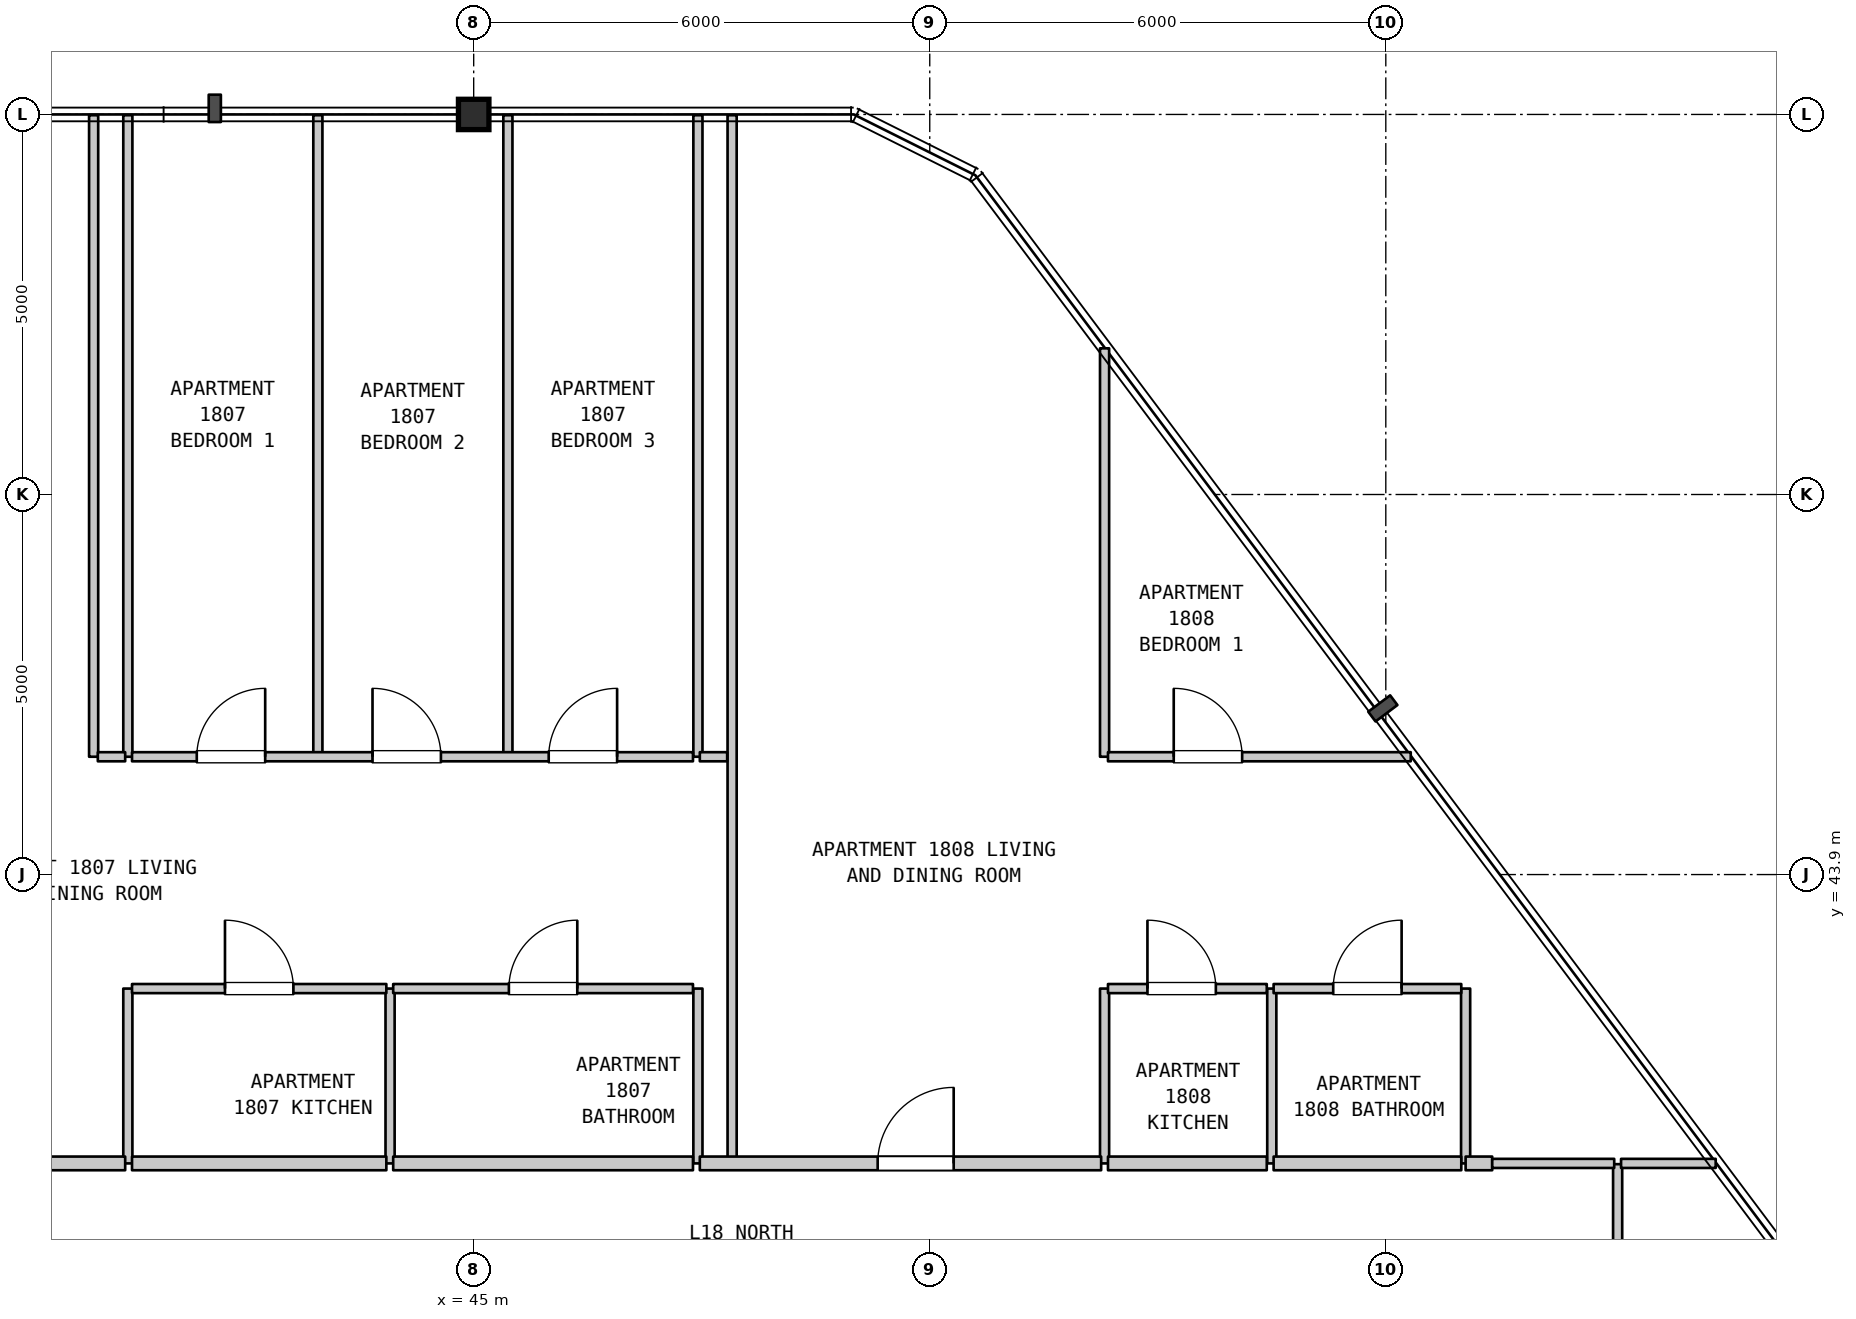
"""IFC4 building model, lengths in metres.
Left out: names, types, materials, properties, quantities, classifications, styles, units other than length and angle.
Written with IfcOpenShell. Run it as: python <this file> out.ifc"""

import sys

from ifc_helpers import new_model, si_unit, direction, frame, frame_2d, origin, origin_2d, place, context, subcontext, project, spatial, rectangle, i_section, extrude, element, fill, save


model = new_model("IFC4")
c1 = context("Model", 3, precision=1e-05, world=origin(), true_north=direction((0.0, 1.0)))
c2 = subcontext(c1, "Body", "Model", "MODEL_VIEW")
j1 = project(units=[si_unit("LENGTHUNIT", "METRE"), si_unit("PLANEANGLEUNIT", "RADIAN")], contexts=[c1])
p1 = place(None, origin())
s1 = spatial("IfcSite", under=j1, at=p1, CompositionType="ELEMENT")
p2 = place(p1, origin())
s2 = spatial("IfcBuilding", under=s1, at=p2, CompositionType="ELEMENT")
p3 = place(p2, frame((0.0, 0.0, 77.5)))
s3 = spatial("IfcBuildingStorey", under=s2, at=p3, CompositionType="ELEMENT", Elevation=77.5)
p4 = place(p3, frame((45.0, 53.9, 0.0), z_axis=(0.0, 0.0, 1.0), x_axis=(1.0, 0.0, 0.0)))
e1 = element("IfcColumn", 1, at=p4, inside=s3, PredefinedType="COLUMN", context=c2, shape_type="SweptSolid", body=[
    extrude(i_section(OverallWidth=0.401, OverallDepth=0.399, WebThickness=0.025, FlangeThickness=0.04, FilletRadius=0.015, at=origin_2d()), origin(), (0.0, 0.0, 1.0), 3.7),
])
p5 = place(p3, frame((40.0, 45.45, 0.0), z_axis=(0.0, 0.0, 1.0), x_axis=(0.0, 1.0, 0.0)))
e2 = element("IfcWall", 2, at=p5, inside=s3, PredefinedType="PARTITIONING", context=c2, shape_type="SweptSolid", body=[
    extrude(rectangle(XDim=8.44, YDim=0.12, at=frame_2d((4.22, 0.0))), origin(), (0.0, 0.0, 1.0), 3.28),
])
p6 = place(p3, frame((40.45, 40.1, 0.0), z_axis=(0.0, 0.0, 1.0), x_axis=(0.0, 1.0, 0.0)))
e3 = element("IfcWall", 3, at=p6, inside=s3, PredefinedType="PARTITIONING", context=c2, shape_type="SweptSolid", body=[
    extrude(rectangle(XDim=2.3, YDim=0.12, at=frame_2d((1.15, 0.0))), origin(), (0.0, 0.0, 1.0), 3.28),
])
for number, where, z_axis, x_axis in (
    (4, (40.45, 45.45, 0.0), (0.0, 0.0, 1.0), (0.0, 1.0, 0.0)),
    (5, (42.95, 45.45, 0.0), (0.0, 0.0, 1.0), (0.0, 1.0, 0.0)),
):
    element("IfcWall", number, at=place(p3, frame(where, z_axis=z_axis, x_axis=x_axis)), inside=s3, PredefinedType="PARTITIONING", context=c2, shape_type="SweptSolid", body=[
        extrude(rectangle(XDim=8.44, YDim=0.12, at=frame_2d((4.22, 0.0))), origin(), (0.0, 0.0, 1.0), 3.28),
    ])
p7 = place(p3, frame((43.9, 40.1, 0.0), z_axis=(0.0, 0.0, 1.0), x_axis=(0.0, 1.0, 0.0)))
e6 = element("IfcWall", 6, at=p7, inside=s3, PredefinedType="PARTITIONING", context=c2, shape_type="SweptSolid", body=[
    extrude(rectangle(XDim=2.3, YDim=0.12, at=frame_2d((1.15, 0.0))), origin(), (0.0, 0.0, 1.0), 3.28),
])
p8 = place(p3, frame((45.45, 45.45, 0.0), z_axis=(0.0, 0.0, 1.0), x_axis=(0.0, 1.0, 0.0)))
e7 = element("IfcWall", 7, at=p8, inside=s3, PredefinedType="PARTITIONING", context=c2, shape_type="SweptSolid", body=[
    extrude(rectangle(XDim=8.44, YDim=0.12, at=frame_2d((4.22, 0.0))), origin(), (0.0, 0.0, 1.0), 3.28),
])
p9 = place(p3, frame((47.95, 40.1, 0.0), z_axis=(0.0, 0.0, 1.0), x_axis=(0.0, 1.0, 0.0)))
e8 = element("IfcWall", 8, at=p9, inside=s3, PredefinedType="PARTITIONING", context=c2, shape_type="SweptSolid", body=[
    extrude(rectangle(XDim=2.3, YDim=0.12, at=frame_2d((1.15, 0.0))), origin(), (0.0, 0.0, 1.0), 3.28),
])
p10 = place(p3, frame((47.95, 45.45, 0.0), z_axis=(0.0, 0.0, 1.0), x_axis=(0.0, 1.0, 0.0)))
e9 = element("IfcWall", 9, at=p10, inside=s3, PredefinedType="PARTITIONING", context=c2, shape_type="SweptSolid", body=[
    extrude(rectangle(XDim=8.44, YDim=0.12, at=frame_2d((4.22, 0.0))), origin(), (0.0, 0.0, 1.0), 3.28),
])
p11 = place(p3, frame((48.4, 40.1, 0.0), z_axis=(0.0, 0.0, 1.0), x_axis=(0.0, 1.0, 0.0)))
e10 = element("IfcWall", 10, at=p11, inside=s3, PredefinedType="PARTITIONING", context=c2, shape_type="SweptSolid", body=[
    extrude(rectangle(XDim=13.79, YDim=0.12, at=frame_2d((6.895, 0.0))), origin(), (0.0, 0.0, 1.0), 3.28),
])
p12 = place(p3, frame((53.3, 40.1, 0.0), z_axis=(0.0, 0.0, 1.0), x_axis=(0.0, 1.0, 0.0)))
e11 = element("IfcWall", 11, at=p12, inside=s3, PredefinedType="PARTITIONING", context=c2, shape_type="SweptSolid", body=[
    extrude(rectangle(XDim=2.3, YDim=0.12, at=frame_2d((1.15, 0.0))), origin(), (0.0, 0.0, 1.0), 3.28),
])
p13 = place(p3, frame((53.3, 45.45, 0.0), z_axis=(0.0, 0.0, 1.0), x_axis=(0.0, 1.0, 0.0)))
e12 = element("IfcWall", 12, at=p13, inside=s3, PredefinedType="PARTITIONING", context=c2, shape_type="SweptSolid", body=[
    extrude(rectangle(XDim=5.373, YDim=0.12, at=frame_2d((2.687, 0.0))), origin(), (0.0, 0.0, 1.0), 3.28),
])
for number, where, z_axis, x_axis in (
    (13, (55.5, 40.1, 0.0), (0.0, 0.0, 1.0), (0.0, 1.0, 0.0)),
    (14, (58.05, 40.1, 0.0), (0.0, 0.0, 1.0), (0.0, 1.0, 0.0)),
):
    element("IfcWall", number, at=place(p3, frame(where, z_axis=z_axis, x_axis=x_axis)), inside=s3, PredefinedType="PARTITIONING", context=c2, shape_type="SweptSolid", body=[
        extrude(rectangle(XDim=2.3, YDim=0.12, at=frame_2d((1.15, 0.0))), origin(), (0.0, 0.0, 1.0), 3.28),
    ])
p14 = place(p3, frame((60.05, 37.89, 0.0), z_axis=(0.0, 0.0, 1.0), x_axis=(0.0, 1.0, 0.0)))
e15 = element("IfcWall", 15, at=p14, inside=s3, PredefinedType="PARTITIONING", context=c2, shape_type="SweptSolid", body=[
    extrude(rectangle(XDim=2.2, YDim=0.12, at=frame_2d((1.1, 0.0))), origin(), (0.0, 0.0, 1.0), 3.28),
])
p15 = place(p3, frame((35.105, 40.1, 0.0), z_axis=(0.0, 0.0, 1.0), x_axis=(1.0, 0.0, 0.0)))
e16 = element("IfcWall", 16, at=p15, inside=s3, PredefinedType="STANDARD", context=c2, shape_type="SweptSolid", body=[
    extrude(rectangle(XDim=5.31, YDim=0.18, at=frame_2d((2.655, 0.0))), origin(), (0.0, 0.0, 1.0), 3.28),
])
p16 = place(p15, frame((2.155, 0.0, 0.0)))
e17 = element("IfcOpeningElement", 17, at=p16, cuts=e16, PredefinedType="OPENING", context=c2, shape_type="SweptSolid", body=[
    extrude(rectangle(XDim=1.0, YDim=2.15, at=frame_2d((0.5, 1.075))), frame((0.0, 0.1, 0.0), z_axis=(0.0, -1.0, 0.0), x_axis=(1.0, 0.0, 0.0)), (0.0, 0.0, 1.0), 0.2),
])
p17 = place(p3, frame((40.505, 40.1, 0.0), z_axis=(0.0, 0.0, 1.0), x_axis=(1.0, 0.0, 0.0)))
e18 = element("IfcWall", 18, at=p17, inside=s3, PredefinedType="STANDARD", context=c2, shape_type="SweptSolid", body=[
    extrude(rectangle(XDim=3.346, YDim=0.18, at=frame_2d((1.673, 0.0))), origin(), (0.0, 0.0, 1.0), 3.28),
])
p18 = place(p3, frame((43.941, 40.1, 0.0), z_axis=(0.0, 0.0, 1.0), x_axis=(1.0, 0.0, 0.0)))
e19 = element("IfcWall", 19, at=p18, inside=s3, PredefinedType="STANDARD", context=c2, shape_type="SweptSolid", body=[
    extrude(rectangle(XDim=3.944, YDim=0.18, at=frame_2d((1.972, 0.0))), origin(), (0.0, 0.0, 1.0), 3.28),
])
p19 = place(p3, frame((47.975, 40.1, 0.0), z_axis=(0.0, 0.0, 1.0), x_axis=(1.0, 0.0, 0.0)))
e20 = element("IfcWall", 20, at=p19, inside=s3, PredefinedType="STANDARD", context=c2, shape_type="SweptSolid", body=[
    extrude(rectangle(XDim=5.28, YDim=0.18, at=frame_2d((2.64, 0.0))), origin(), (0.0, 0.0, 1.0), 3.28),
])
p20 = place(p19, frame((2.34, 0.0, 0.0)))
e21 = element("IfcOpeningElement", 21, at=p20, cuts=e20, PredefinedType="OPENING", context=c2, shape_type="SweptSolid", body=[
    extrude(rectangle(XDim=1.0, YDim=2.15, at=frame_2d((0.5, 1.075))), frame((0.0, 0.1, 0.0), z_axis=(0.0, -1.0, 0.0), x_axis=(1.0, 0.0, 0.0)), (0.0, 0.0, 1.0), 0.2),
])
p21 = place(p3, frame((53.345, 40.1, 0.0), z_axis=(0.0, 0.0, 1.0), x_axis=(1.0, 0.0, 0.0)))
e22 = element("IfcWall", 22, at=p21, inside=s3, PredefinedType="STANDARD", context=c2, shape_type="SweptSolid", body=[
    extrude(rectangle(XDim=2.089, YDim=0.18, at=frame_2d((1.044, 0.0))), origin(), (0.0, 0.0, 1.0), 3.28),
])
p22 = place(p3, frame((55.524, 40.1, 0.0), z_axis=(0.0, 0.0, 1.0), x_axis=(1.0, 0.0, 0.0)))
e23 = element("IfcWall", 23, at=p22, inside=s3, PredefinedType="STANDARD", context=c2, shape_type="SweptSolid", body=[
    extrude(rectangle(XDim=2.469, YDim=0.18, at=frame_2d((1.234, 0.0))), origin(), (0.0, 0.0, 1.0), 3.28),
])
p23 = place(p3, frame((58.05, 40.1, 0.0), z_axis=(0.0, 0.0, 1.0), x_axis=(1.0, 0.0, 0.0)))
e24 = element("IfcWall", 24, at=p23, inside=s3, PredefinedType="STANDARD", context=c2, shape_type="SweptSolid", body=[
    extrude(rectangle(XDim=0.35, YDim=0.18, at=frame_2d((0.175, 0.0))), origin(), (0.0, 0.0, 1.0), 3.28),
])
p24 = place(p3, frame((58.4, 40.1, 0.0), z_axis=(0.0, 0.0, 1.0), x_axis=(1.0, 0.0, 0.0)))
e25 = element("IfcWall", 25, at=p24, inside=s3, PredefinedType="PARTITIONING", context=c2, shape_type="SweptSolid", body=[
    extrude(rectangle(XDim=1.605, YDim=0.12, at=frame_2d((0.802, 0.0))), origin(), (0.0, 0.0, 1.0), 3.28),
])
p25 = place(p3, frame((60.095, 40.1, 0.0), z_axis=(0.0, 0.0, 1.0), x_axis=(1.0, 0.0, 0.0)))
e26 = element("IfcWall", 26, at=p25, inside=s3, PredefinedType="PARTITIONING", context=c2, shape_type="SweptSolid", body=[
    extrude(rectangle(XDim=1.245, YDim=0.12, at=frame_2d((0.623, 0.0))), origin(), (0.0, 0.0, 1.0), 3.28),
])
p26 = place(p3, frame((40.505, 42.4, 0.0), z_axis=(0.0, 0.0, 1.0), x_axis=(1.0, 0.0, 0.0)))
e27 = element("IfcWall", 27, at=p26, inside=s3, PredefinedType="PARTITIONING", context=c2, shape_type="SweptSolid", body=[
    extrude(rectangle(XDim=3.346, YDim=0.12, at=frame_2d((1.673, 0.0))), origin(), (0.0, 0.0, 1.0), 3.28),
])
p27 = place(p26, frame((1.223, 0.0, 0.0)))
e28 = element("IfcOpeningElement", 28, at=p27, cuts=e27, PredefinedType="OPENING", context=c2, shape_type="SweptSolid", body=[
    extrude(rectangle(XDim=0.9, YDim=2.15, at=frame_2d((0.45, 1.075))), frame((0.0, 0.07, 0.0), z_axis=(0.0, -1.0, 0.0), x_axis=(1.0, 0.0, 0.0)), (0.0, 0.0, 1.0), 0.14),
])
p28 = place(p3, frame((43.941, 42.4, 0.0), z_axis=(0.0, 0.0, 1.0), x_axis=(1.0, 0.0, 0.0)))
e29 = element("IfcWall", 29, at=p28, inside=s3, PredefinedType="PARTITIONING", context=c2, shape_type="SweptSolid", body=[
    extrude(rectangle(XDim=3.944, YDim=0.12, at=frame_2d((1.972, 0.0))), origin(), (0.0, 0.0, 1.0), 3.28),
])
p29 = place(p28, frame((1.522, 0.0, 0.0)))
e30 = element("IfcOpeningElement", 30, at=p29, cuts=e29, PredefinedType="OPENING", context=c2, shape_type="SweptSolid", body=[
    extrude(rectangle(XDim=0.9, YDim=2.1, at=frame_2d((0.45, 1.05))), frame((0.0, 0.07, 0.0), z_axis=(0.0, -1.0, 0.0), x_axis=(1.0, 0.0, 0.0)), (0.0, 0.0, 1.0), 0.14),
])
p30 = place(p3, frame((53.345, 42.4, 0.0), z_axis=(0.0, 0.0, 1.0), x_axis=(1.0, 0.0, 0.0)))
e31 = element("IfcWall", 31, at=p30, inside=s3, PredefinedType="PARTITIONING", context=c2, shape_type="SweptSolid", body=[
    extrude(rectangle(XDim=2.089, YDim=0.12, at=frame_2d((1.044, 0.0))), origin(), (0.0, 0.0, 1.0), 3.28),
])
p31 = place(p30, frame((0.519, 0.0, 0.0)))
e32 = element("IfcOpeningElement", 32, at=p31, cuts=e31, PredefinedType="OPENING", context=c2, shape_type="SweptSolid", body=[
    extrude(rectangle(XDim=0.9, YDim=2.15, at=frame_2d((0.45, 1.075))), frame((0.0, 0.07, 0.0), z_axis=(0.0, -1.0, 0.0), x_axis=(1.0, 0.0, 0.0)), (0.0, 0.0, 1.0), 0.14),
])
p32 = place(p3, frame((55.524, 42.4, 0.0), z_axis=(0.0, 0.0, 1.0), x_axis=(1.0, 0.0, 0.0)))
e33 = element("IfcWall", 33, at=p32, inside=s3, PredefinedType="PARTITIONING", context=c2, shape_type="SweptSolid", body=[
    extrude(rectangle(XDim=2.469, YDim=0.12, at=frame_2d((1.234, 0.0))), origin(), (0.0, 0.0, 1.0), 3.28),
])
p33 = place(p32, frame((0.784, 0.0, 0.0)))
e34 = element("IfcOpeningElement", 34, at=p33, cuts=e33, PredefinedType="OPENING", context=c2, shape_type="SweptSolid", body=[
    extrude(rectangle(XDim=0.9, YDim=2.1, at=frame_2d((0.45, 1.05))), frame((0.0, 0.07, 0.0), z_axis=(0.0, -1.0, 0.0), x_axis=(1.0, 0.0, 0.0)), (0.0, 0.0, 1.0), 0.14),
])
p34 = place(p3, frame((40.055, 45.45, 0.0), z_axis=(0.0, 0.0, 1.0), x_axis=(1.0, 0.0, 0.0)))
e35 = element("IfcWall", 35, at=p34, inside=s3, PredefinedType="PARTITIONING", context=c2, shape_type="SweptSolid", body=[
    extrude(rectangle(XDim=0.36, YDim=0.12, at=frame_2d((0.18, 0.0))), origin(), (0.0, 0.0, 1.0), 3.28),
])
p35 = place(p3, frame((40.505, 45.45, 0.0), z_axis=(0.0, 0.0, 1.0), x_axis=(1.0, 0.0, 0.0)))
e36 = element("IfcWall", 36, at=p35, inside=s3, PredefinedType="PARTITIONING", context=c2, shape_type="SweptSolid", body=[
    extrude(rectangle(XDim=7.38, YDim=0.12, at=frame_2d((3.69, 0.0))), origin(), (0.0, 0.0, 1.0), 3.28),
])
p36 = place(p35, frame((0.852, 0.0, 0.0)))
e37 = element("IfcOpeningElement", 37, at=p36, cuts=e36, PredefinedType="OPENING", context=c2, shape_type="SweptSolid", body=[
    extrude(rectangle(XDim=0.9, YDim=2.15, at=frame_2d((0.45, 1.075))), frame((0.0, 0.07, 0.0), z_axis=(0.0, -1.0, 0.0), x_axis=(1.0, 0.0, 0.0)), (0.0, 0.0, 1.0), 0.14),
])
p37 = place(p35, frame((3.164, 0.0, 0.0)))
e38 = element("IfcOpeningElement", 38, at=p37, cuts=e36, PredefinedType="OPENING", context=c2, shape_type="SweptSolid", body=[
    extrude(rectangle(XDim=0.9, YDim=2.15, at=frame_2d((0.45, 1.075))), frame((0.0, 0.07, 0.0), z_axis=(0.0, -1.0, 0.0), x_axis=(1.0, 0.0, 0.0)), (0.0, 0.0, 1.0), 0.14),
])
p38 = place(p35, frame((5.482, 0.0, 0.0)))
e39 = element("IfcOpeningElement", 39, at=p38, cuts=e36, PredefinedType="OPENING", context=c2, shape_type="SweptSolid", body=[
    extrude(rectangle(XDim=0.9, YDim=2.15, at=frame_2d((0.45, 1.075))), frame((0.0, 0.07, 0.0), z_axis=(0.0, -1.0, 0.0), x_axis=(1.0, 0.0, 0.0)), (0.0, 0.0, 1.0), 0.14),
])
p39 = place(p3, frame((47.975, 45.45, 0.0), z_axis=(0.0, 0.0, 1.0), x_axis=(1.0, 0.0, 0.0)))
e40 = element("IfcWall", 40, at=p39, inside=s3, PredefinedType="PARTITIONING", context=c2, shape_type="SweptSolid", body=[
    extrude(rectangle(XDim=0.36, YDim=0.12, at=frame_2d((0.18, 0.0))), origin(), (0.0, 0.0, 1.0), 3.28),
])
p40 = place(p3, frame((53.345, 45.45, 0.0), z_axis=(0.0, 0.0, 1.0), x_axis=(1.0, 0.0, 0.0)))
e41 = element("IfcWall", 41, at=p40, inside=s3, PredefinedType="PARTITIONING", context=c2, shape_type="SweptSolid", body=[
    extrude(rectangle(XDim=3.983, YDim=0.12, at=frame_2d((1.991, 0.0))), origin(), (0.0, 0.0, 1.0), 3.28),
])
p41 = place(p40, frame((0.865, 0.0, 0.0)))
e42 = element("IfcOpeningElement", 42, at=p41, cuts=e41, PredefinedType="OPENING", context=c2, shape_type="SweptSolid", body=[
    extrude(rectangle(XDim=0.9, YDim=2.15, at=frame_2d((0.45, 1.075))), frame((0.0, 0.07, 0.0), z_axis=(0.0, -1.0, 0.0), x_axis=(1.0, 0.0, 0.0)), (0.0, 0.0, 1.0), 0.14),
])
p42 = place(p20, origin())
e43 = element("IfcDoor", 43, at=p42, inside=s3, OperationType="SINGLE_SWING_RIGHT", PredefinedType="DOOR", context=c2, shape_type="SweptSolid", body=[
    extrude(rectangle(XDim=1.0, YDim=2.15, at=frame_2d((0.5, 1.075))), frame((0.0, 0.025, 0.0), z_axis=(0.0, -1.0, 0.0), x_axis=(1.0, 0.0, 0.0)), (0.0, 0.0, 1.0), 0.05),
])
fill(e21, e43)
p43 = place(p27, origin())
e44 = element("IfcDoor", 44, at=p43, inside=s3, OperationType="SINGLE_SWING_LEFT", PredefinedType="DOOR", context=c2, shape_type="SweptSolid", body=[
    extrude(rectangle(XDim=0.9, YDim=2.15, at=frame_2d((0.45, 1.075))), frame((0.0, 0.025, 0.0), z_axis=(0.0, -1.0, 0.0), x_axis=(1.0, 0.0, 0.0)), (0.0, 0.0, 1.0), 0.05),
])
fill(e28, e44)
p44 = place(p29, origin())
e45 = element("IfcDoor", 45, at=p44, inside=s3, OperationType="SINGLE_SWING_RIGHT", PredefinedType="DOOR", context=c2, shape_type="SweptSolid", body=[
    extrude(rectangle(XDim=0.9, YDim=2.1, at=frame_2d((0.45, 1.05))), frame((0.0, 0.025, 0.0), z_axis=(0.0, -1.0, 0.0), x_axis=(1.0, 0.0, 0.0)), (0.0, 0.0, 1.0), 0.05),
])
fill(e30, e45)
p45 = place(p31, origin())
e46 = element("IfcDoor", 46, at=p45, inside=s3, OperationType="SINGLE_SWING_LEFT", PredefinedType="DOOR", context=c2, shape_type="SweptSolid", body=[
    extrude(rectangle(XDim=0.9, YDim=2.15, at=frame_2d((0.45, 1.075))), frame((0.0, 0.025, 0.0), z_axis=(0.0, -1.0, 0.0), x_axis=(1.0, 0.0, 0.0)), (0.0, 0.0, 1.0), 0.05),
])
fill(e32, e46)
p46 = place(p33, origin())
e47 = element("IfcDoor", 47, at=p46, inside=s3, OperationType="SINGLE_SWING_RIGHT", PredefinedType="DOOR", context=c2, shape_type="SweptSolid", body=[
    extrude(rectangle(XDim=0.9, YDim=2.1, at=frame_2d((0.45, 1.05))), frame((0.0, 0.025, 0.0), z_axis=(0.0, -1.0, 0.0), x_axis=(1.0, 0.0, 0.0)), (0.0, 0.0, 1.0), 0.05),
])
fill(e34, e47)
p47 = place(p36, origin())
e48 = element("IfcDoor", 48, at=p47, inside=s3, OperationType="SINGLE_SWING_RIGHT", PredefinedType="DOOR", context=c2, shape_type="SweptSolid", body=[
    extrude(rectangle(XDim=0.9, YDim=2.15, at=frame_2d((0.45, 1.075))), frame((0.0, 0.025, 0.0), z_axis=(0.0, -1.0, 0.0), x_axis=(1.0, 0.0, 0.0)), (0.0, 0.0, 1.0), 0.05),
])
fill(e37, e48)
p48 = place(p37, origin())
e49 = element("IfcDoor", 49, at=p48, inside=s3, OperationType="SINGLE_SWING_LEFT", PredefinedType="DOOR", context=c2, shape_type="SweptSolid", body=[
    extrude(rectangle(XDim=0.9, YDim=2.15, at=frame_2d((0.45, 1.075))), frame((0.0, 0.025, 0.0), z_axis=(0.0, -1.0, 0.0), x_axis=(1.0, 0.0, 0.0)), (0.0, 0.0, 1.0), 0.05),
])
fill(e38, e49)
p49 = place(p38, origin())
e50 = element("IfcDoor", 50, at=p49, inside=s3, OperationType="SINGLE_SWING_RIGHT", PredefinedType="DOOR", context=c2, shape_type="SweptSolid", body=[
    extrude(rectangle(XDim=0.9, YDim=2.15, at=frame_2d((0.45, 1.075))), frame((0.0, 0.025, 0.0), z_axis=(0.0, -1.0, 0.0), x_axis=(1.0, 0.0, 0.0)), (0.0, 0.0, 1.0), 0.05),
])
fill(e39, e50)
p50 = place(p41, origin())
e51 = element("IfcDoor", 51, at=p50, inside=s3, OperationType="SINGLE_SWING_LEFT", PredefinedType="DOOR", context=c2, shape_type="SweptSolid", body=[
    extrude(rectangle(XDim=0.9, YDim=2.15, at=frame_2d((0.45, 1.075))), frame((0.0, 0.025, 0.0), z_axis=(0.0, -1.0, 0.0), x_axis=(1.0, 0.0, 0.0)), (0.0, 0.0, 1.0), 0.05),
])
fill(e42, e51)
save(model, sys.argv[1])
